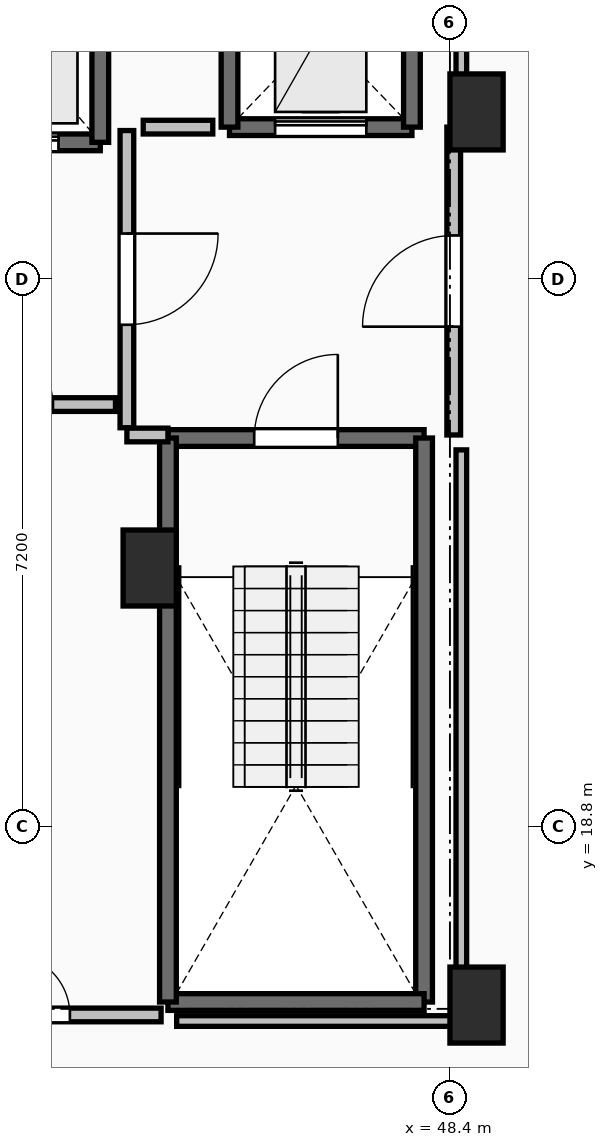
"""IFC4 building model, lengths in metres.
Left out: names, types, materials, properties, quantities, classifications, styles, units other than length and angle.
Written with IfcOpenShell. Run it as: python <this file> out.ifc"""

import sys

from ifc_helpers import new_model, si_unit, direction, frame, frame_2d, origin, origin_2d, place, context, subcontext, project, spatial, rectangle, extrude, element, fill, save


model = new_model("IFC4")
c1 = context("Model", 3, precision=1e-05, world=origin(), true_north=direction((0.0, 1.0)))
c2 = subcontext(c1, "Body", "Model", "MODEL_VIEW")
j1 = project(units=[si_unit("LENGTHUNIT", "METRE"), si_unit("PLANEANGLEUNIT", "RADIAN")], contexts=[c1])
p1 = place(None, origin())
s1 = spatial("IfcSite", under=j1, at=p1, CompositionType="ELEMENT")
p2 = place(p1, origin())
s2 = spatial("IfcBuilding", under=s1, at=p2, CompositionType="ELEMENT")
p3 = place(p2, frame((0.0, 0.0, 262.65)))
s3 = spatial("IfcBuildingStorey", under=s2, at=p3, CompositionType="ELEMENT", Elevation=262.65)
for number, where, z_axis, x_axis in (
    (1, (48.75, 28.2, 0.0), (0.0, 0.0, 1.0), (1.0, 0.0, 0.0)),
    (2, (48.75, 16.45, 0.0), (0.0, 0.0, 1.0), (1.0, 0.0, 0.0)),
    (3, (44.45, 22.2, 0.0), (0.0, 0.0, 1.0), (1.0, 0.0, 0.0)),
):
    element("IfcColumn", number, at=place(p3, frame(where, z_axis=z_axis, x_axis=x_axis)), inside=s3, PredefinedType="PILASTER", context=c2, shape_type="SweptSolid", body=[
        extrude(rectangle(XDim=0.7, YDim=1.0, at=origin_2d()), origin(), (0.0, 0.0, 1.0), 3.55),
    ])
p4 = place(p3, frame((44.69, 23.91, 0.0), z_axis=(0.0, 0.0, 1.0), x_axis=(1.0, 0.0, 0.0)))
e4 = element("IfcWall", 4, at=p4, inside=s3, PredefinedType="SOLIDWALL", context=c2, shape_type="SweptSolid", body=[
    extrude(rectangle(XDim=3.37, YDim=0.22, at=frame_2d((1.685, 0.0))), origin(), (0.0, 0.0, 1.0), 3.29),
])
p5 = place(p4, frame((1.135, 0.0, 0.0)))
e5 = element("IfcOpeningElement", 5, at=p5, cuts=e4, PredefinedType="OPENING", context=c2, shape_type="SweptSolid", body=[
    extrude(rectangle(XDim=1.1, YDim=2.15, at=frame_2d((0.55, 1.075))), frame((0.0, 0.125, 0.0), z_axis=(0.0, -1.0, 0.0), x_axis=(1.0, 0.0, 0.0)), (0.0, 0.0, 1.0), 0.25),
])
p6 = place(p3, frame((48.06, 23.91, 0.0), z_axis=(0.0, 0.0, 1.0), x_axis=(0.0, -1.0, 0.0)))
e6 = element("IfcWall", 6, at=p6, inside=s3, PredefinedType="SOLIDWALL", context=c2, shape_type="SweptSolid", body=[
    extrude(rectangle(XDim=7.42, YDim=0.22, at=frame_2d((3.71, 0.0))), origin(), (0.0, 0.0, 1.0), 3.29),
])
p7 = place(p3, frame((48.06, 16.49, 0.0), z_axis=(0.0, 0.0, 1.0), x_axis=(-1.0, 0.0, 0.0)))
e7 = element("IfcWall", 7, at=p7, inside=s3, PredefinedType="SOLIDWALL", context=c2, shape_type="SweptSolid", body=[
    extrude(rectangle(XDim=3.37, YDim=0.22, at=frame_2d((1.685, 0.0))), origin(), (0.0, 0.0, 1.0), 3.29),
])
p8 = place(p3, frame((44.69, 16.49, 0.0), z_axis=(0.0, 0.0, 1.0), x_axis=(0.0, 1.0, 0.0)))
e8 = element("IfcWall", 8, at=p8, inside=s3, PredefinedType="SOLIDWALL", context=c2, shape_type="SweptSolid", body=[
    extrude(rectangle(XDim=7.42, YDim=0.22, at=frame_2d((3.71, 0.0))), origin(), (0.0, 0.0, 1.0), 3.29),
])
p9 = place(p3, frame((41.6, 27.8, 0.0), z_axis=(0.0, 0.0, 1.0), x_axis=(1.0, 0.0, 0.0)))
e9 = element("IfcWall", 9, at=p9, inside=s3, PredefinedType="SOLIDWALL", context=c2, shape_type="SweptSolid", body=[
    extrude(rectangle(XDim=2.2, YDim=0.22, at=frame_2d((1.1, 0.0))), origin(), (0.0, 0.0, 1.0), 3.29),
])
p10 = place(p9, frame((0.55, 0.0, 0.0)))
e10 = element("IfcOpeningElement", 10, at=p10, cuts=e9, PredefinedType="OPENING", context=c2, shape_type="SweptSolid", body=[
    extrude(rectangle(XDim=1.1, YDim=2.2, at=frame_2d((0.55, 1.1))), frame((0.0, 0.125, 0.0), z_axis=(0.0, -1.0, 0.0), x_axis=(1.0, 0.0, 0.0)), (0.0, 0.0, 1.0), 0.25),
])
p11 = place(p3, frame((43.8, 27.8, 0.0), z_axis=(0.0, 0.0, 1.0), x_axis=(0.0, 1.0, 0.0)))
e11 = element("IfcWall", 11, at=p11, inside=s3, PredefinedType="SOLIDWALL", context=c2, shape_type="SweptSolid", body=[
    extrude(rectangle(XDim=2.6, YDim=0.22, at=frame_2d((1.3, 0.0))), origin(), (0.0, 0.0, 1.0), 3.29),
])
p12 = place(p3, frame((45.5, 28.0, 0.0), z_axis=(0.0, 0.0, 1.0), x_axis=(1.0, 0.0, 0.0)))
e12 = element("IfcWall", 12, at=p12, inside=s3, PredefinedType="SHEAR", context=c2, shape_type="SweptSolid", body=[
    extrude(rectangle(XDim=2.4, YDim=0.22, at=frame_2d((1.2, 0.0))), origin(), (0.0, 0.0, 1.0), 3.29),
])
p13 = place(p12, frame((0.6, 0.0, 0.0)))
e13 = element("IfcOpeningElement", 13, at=p13, cuts=e12, PredefinedType="OPENING", context=c2, shape_type="SweptSolid", body=[
    extrude(rectangle(XDim=1.2, YDim=2.2, at=frame_2d((0.6, 1.1))), frame((0.0, 0.125, 0.0), z_axis=(0.0, -1.0, 0.0), x_axis=(1.0, 0.0, 0.0)), (0.0, 0.0, 1.0), 0.25),
])
for number, where, z_axis, x_axis in (
    (14, (47.9, 28.0, 0.0), (0.0, 0.0, 1.0), (0.0, 1.0, 0.0)),
    (15, (45.5, 30.5, 0.0), (0.0, 0.0, 1.0), (0.0, -1.0, 0.0)),
):
    element("IfcWall", number, at=place(p3, frame(where, z_axis=z_axis, x_axis=x_axis)), inside=s3, PredefinedType="SHEAR", context=c2, shape_type="SweptSolid", body=[
        extrude(rectangle(XDim=2.5, YDim=0.22, at=frame_2d((1.25, 0.0))), origin(), (0.0, 0.0, 1.0), 3.29),
    ])
p14 = place(p3, frame((44.15, 27.955, 0.0), z_axis=(0.0, 0.0, 1.0), x_axis=(0.0, -1.0, 0.0)))
e16 = element("IfcWall", 16, at=p14, inside=s3, PredefinedType="PARTITIONING", context=c2, shape_type="SweptSolid", body=[
    extrude(rectangle(XDim=3.91, YDim=0.18, at=frame_2d((1.955, 0.0))), origin(), (0.0, 0.0, 1.0), 3.29),
])
p15 = place(p14, frame((1.355, 0.0, 0.0)))
e17 = element("IfcOpeningElement", 17, at=p15, cuts=e16, PredefinedType="OPENING", context=c2, shape_type="SweptSolid", body=[
    extrude(rectangle(XDim=1.2, YDim=2.15, at=frame_2d((0.6, 1.075))), frame((0.0, 0.105, 0.0), z_axis=(0.0, -1.0, 0.0), x_axis=(1.0, 0.0, 0.0)), (0.0, 0.0, 1.0), 0.21),
])
p16 = place(p3, frame((44.15, 23.95, 0.0), z_axis=(0.0, 0.0, 1.0), x_axis=(1.0, 0.0, 0.0)))
e18 = element("IfcWall", 18, at=p16, inside=s3, PredefinedType="PARTITIONING", context=c2, shape_type="SweptSolid", body=[
    extrude(rectangle(XDim=0.54, YDim=0.18, at=frame_2d((0.27, 0.0))), origin(), (0.0, 0.0, 1.0), 3.29),
])
p17 = place(p3, frame((48.45, 23.95, 0.0), z_axis=(0.0, 0.0, 1.0), x_axis=(0.0, 1.0, 0.0)))
e19 = element("IfcWall", 19, at=p17, inside=s3, PredefinedType="PARTITIONING", context=c2, shape_type="SweptSolid", body=[
    extrude(rectangle(XDim=4.05, YDim=0.18, at=frame_2d((2.025, 0.0))), origin(), (0.0, 0.0, 1.0), 3.29),
])
p18 = place(p17, frame((1.425, 0.0, 0.0)))
e20 = element("IfcOpeningElement", 20, at=p18, cuts=e19, PredefinedType="OPENING", context=c2, shape_type="SweptSolid", body=[
    extrude(rectangle(XDim=1.2, YDim=2.15, at=frame_2d((0.6, 1.075))), frame((0.0, 0.105, 0.0), z_axis=(0.0, -1.0, 0.0), x_axis=(1.0, 0.0, 0.0)), (0.0, 0.0, 1.0), 0.21),
])
p19 = place(p3, frame((41.555, 24.35, 0.0), z_axis=(0.0, 0.0, 1.0), x_axis=(1.0, 0.0, 0.0)))
e21 = element("IfcWall", 21, at=p19, inside=s3, PredefinedType="PARTITIONING", context=c2, shape_type="SweptSolid", body=[
    extrude(rectangle(XDim=2.445, YDim=0.18, at=frame_2d((1.223, 0.0))), origin(), (0.0, 0.0, 1.0), 3.29),
])
p20 = place(p19, frame((0.823, 0.0, 0.0)))
e22 = element("IfcOpeningElement", 22, at=p20, cuts=e21, PredefinedType="OPENING", context=c2, shape_type="SweptSolid", body=[
    extrude(rectangle(XDim=0.8, YDim=2.05, at=frame_2d((0.4, 1.025))), frame((0.0, 0.105, 0.0), z_axis=(0.0, -1.0, 0.0), x_axis=(1.0, 0.0, 0.0)), (0.0, 0.0, 1.0), 0.21),
])
p21 = place(p3, frame((41.4, 16.32, 0.0), z_axis=(0.0, 0.0, 1.0), x_axis=(1.0, 0.0, 0.0)))
e23 = element("IfcWall", 23, at=p21, inside=s3, PredefinedType="PARTITIONING", context=c2, shape_type="SweptSolid", body=[
    extrude(rectangle(XDim=3.2, YDim=0.18, at=frame_2d((1.6, 0.0))), origin(), (0.0, 0.0, 1.0), 3.29),
])
p22 = place(p21, frame((1.2, 0.0, 0.0)))
e24 = element("IfcOpeningElement", 24, at=p22, cuts=e23, PredefinedType="OPENING", context=c2, shape_type="SweptSolid", body=[
    extrude(rectangle(XDim=0.8, YDim=2.05, at=frame_2d((0.4, 1.025))), frame((0.0, 0.105, 0.0), z_axis=(0.0, -1.0, 0.0), x_axis=(1.0, 0.0, 0.0)), (0.0, 0.0, 1.0), 0.21),
])
p23 = place(p3, frame((45.28, 28.0, 0.0), z_axis=(0.0, 0.0, 1.0), x_axis=(-1.0, 0.0, 0.0)))
e25 = element("IfcWall", 25, at=p23, inside=s3, PredefinedType="PARTITIONING", context=c2, shape_type="SweptSolid", body=[
    extrude(rectangle(XDim=0.915, YDim=0.18, at=frame_2d((0.458, 0.0))), origin(), (0.0, 0.0, 1.0), 3.29),
])
p24 = place(p3, frame((44.805, 16.24, 0.0), z_axis=(0.0, 0.0, 1.0), x_axis=(1.0, 0.0, 0.0)))
e26 = element("IfcWall", 26, at=p24, inside=s3, PredefinedType="PARTITIONING", context=c2, shape_type="SweptSolid", body=[
    extrude(rectangle(XDim=3.745, YDim=0.14, at=frame_2d((1.873, 0.0))), origin(), (0.0, 0.0, 1.0), 2.482),
])
p25 = place(p3, frame((48.55, 16.24, 0.0), z_axis=(0.0, 0.0, 1.0), x_axis=(0.0, 1.0, 0.0)))
e27 = element("IfcWall", 27, at=p25, inside=s3, PredefinedType="PARTITIONING", context=c2, shape_type="SweptSolid", body=[
    extrude(rectangle(XDim=7.514, YDim=0.14, at=frame_2d((3.757, 0.0))), origin(), (0.0, 0.0, 1.0), 2.482),
])
p26 = place(p3, frame((48.55, 28.196, 0.0), z_axis=(0.0, 0.0, 1.0), x_axis=(0.0, 1.0, 0.0)))
e28 = element("IfcWall", 28, at=p26, inside=s3, PredefinedType="PARTITIONING", context=c2, shape_type="SweptSolid", body=[
    extrude(rectangle(XDim=5.254, YDim=0.14, at=frame_2d((2.627, 0.0))), origin(), (0.0, 0.0, 1.0), 2.482),
])
p27 = place(p5, origin())
e29 = element("IfcDoor", 29, at=p27, inside=s3, OperationType="SINGLE_SWING_RIGHT", PredefinedType="DOOR", context=c2, shape_type="SweptSolid", body=[
    extrude(rectangle(XDim=1.1, YDim=2.15, at=frame_2d((0.55, 1.075))), frame((0.0, 0.025, 0.0), z_axis=(0.0, -1.0, 0.0), x_axis=(1.0, 0.0, 0.0)), (0.0, 0.0, 1.0), 0.05),
])
fill(e5, e29)
p28 = place(p10, origin())
e30 = element("IfcDoor", 30, at=p28, inside=s3, OperationType="SLIDING_TO_LEFT", PredefinedType="DOOR", context=c2, shape_type="SweptSolid", body=[
    extrude(rectangle(XDim=1.1, YDim=2.2, at=frame_2d((0.55, 1.1))), frame((0.0, 0.025, 0.0), z_axis=(0.0, -1.0, 0.0), x_axis=(1.0, 0.0, 0.0)), (0.0, 0.0, 1.0), 0.05),
])
fill(e10, e30)
p29 = place(p13, origin())
e31 = element("IfcDoor", 31, at=p29, inside=s3, OperationType="SLIDING_TO_LEFT", PredefinedType="DOOR", context=c2, shape_type="SweptSolid", body=[
    extrude(rectangle(XDim=1.2, YDim=2.2, at=frame_2d((0.6, 1.1))), frame((0.0, 0.025, 0.0), z_axis=(0.0, -1.0, 0.0), x_axis=(1.0, 0.0, 0.0)), (0.0, 0.0, 1.0), 0.05),
])
fill(e13, e31)
p30 = place(p15, origin())
e32 = element("IfcDoor", 32, at=p30, inside=s3, OperationType="SINGLE_SWING_LEFT", PredefinedType="DOOR", context=c2, shape_type="SweptSolid", body=[
    extrude(rectangle(XDim=1.2, YDim=2.15, at=frame_2d((0.6, 1.075))), frame((0.0, 0.025, 0.0), z_axis=(0.0, -1.0, 0.0), x_axis=(1.0, 0.0, 0.0)), (0.0, 0.0, 1.0), 0.05),
])
fill(e17, e32)
p31 = place(p18, origin())
e33 = element("IfcDoor", 33, at=p31, inside=s3, OperationType="SINGLE_SWING_LEFT", PredefinedType="DOOR", context=c2, shape_type="SweptSolid", body=[
    extrude(rectangle(XDim=1.2, YDim=2.15, at=frame_2d((0.6, 1.075))), frame((0.0, 0.025, 0.0), z_axis=(0.0, -1.0, 0.0), x_axis=(1.0, 0.0, 0.0)), (0.0, 0.0, 1.0), 0.05),
])
fill(e20, e33)
p32 = place(p20, origin())
e34 = element("IfcDoor", 34, at=p32, inside=s3, OperationType="SINGLE_SWING_LEFT", PredefinedType="DOOR", context=c2, shape_type="SweptSolid", body=[
    extrude(rectangle(XDim=0.8, YDim=2.05, at=frame_2d((0.4, 1.025))), frame((0.0, 0.025, 0.0), z_axis=(0.0, -1.0, 0.0), x_axis=(1.0, 0.0, 0.0)), (0.0, 0.0, 1.0), 0.05),
])
fill(e22, e34)
p33 = place(p22, origin())
e35 = element("IfcDoor", 35, at=p33, inside=s3, OperationType="SINGLE_SWING_LEFT", PredefinedType="DOOR", context=c2, shape_type="SweptSolid", body=[
    extrude(rectangle(XDim=0.8, YDim=2.05, at=frame_2d((0.4, 1.025))), frame((0.0, 0.025, 0.0), z_axis=(0.0, -1.0, 0.0), x_axis=(1.0, 0.0, 0.0)), (0.0, 0.0, 1.0), 0.05),
])
fill(e24, e35)
save(model, sys.argv[1])
